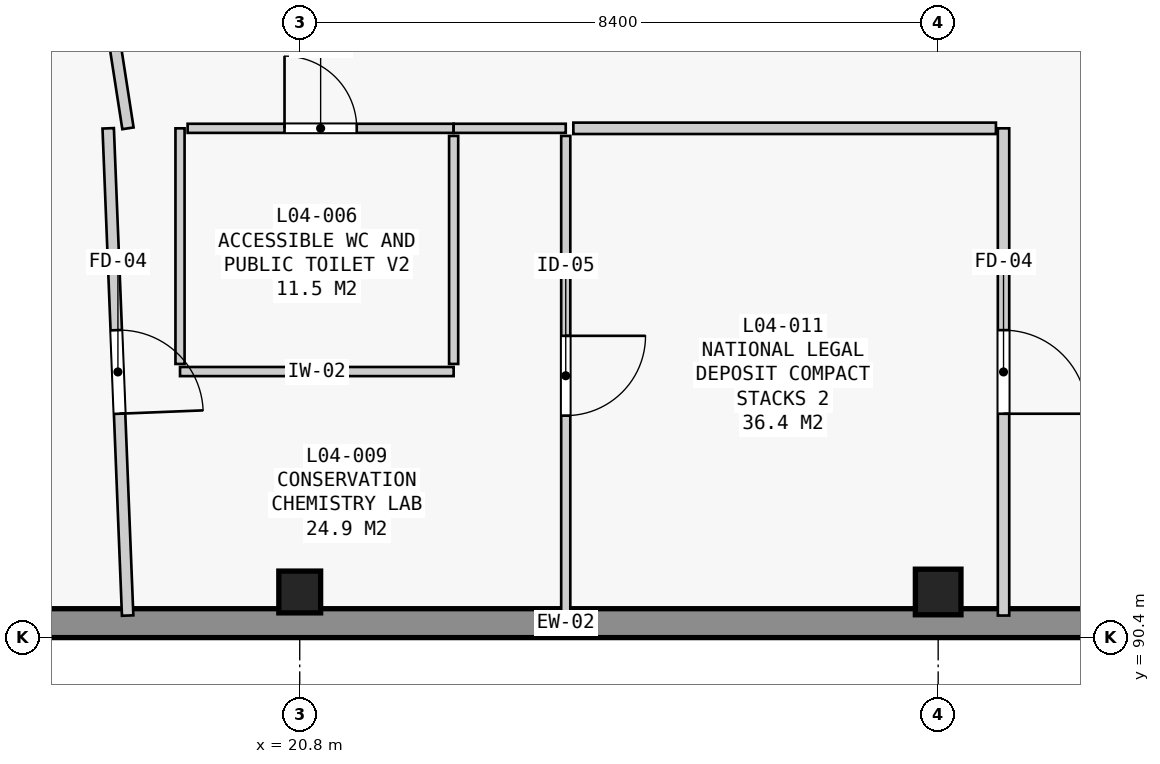
"""IFC4 building model, lengths in metres.
Left out: names, types, materials, properties, quantities, classifications, styles, units other than length and angle.
Written with IfcOpenShell. Run it as: python <this file> out.ifc"""

import sys

from ifc_helpers import new_model, si_unit, direction, frame, frame_2d, origin, origin_2d, place, context, subcontext, project, spatial, rectangle, extrude, element, fill, save


model = new_model("IFC4")
c1 = context("Model", 3, precision=1e-05, world=origin(), true_north=direction((0.0, 1.0)))
c2 = subcontext(c1, "Body", "Model", "MODEL_VIEW")
j1 = project(units=[si_unit("LENGTHUNIT", "METRE"), si_unit("PLANEANGLEUNIT", "RADIAN")], contexts=[c1])
p1 = place(None, origin())
s1 = spatial("IfcSite", under=j1, at=p1, CompositionType="ELEMENT")
p2 = place(p1, origin())
s2 = spatial("IfcBuilding", under=s1, at=p2, CompositionType="ELEMENT")
p3 = place(p2, frame((0.0, 0.0, 18.3)))
s3 = spatial("IfcBuildingStorey", under=s2, at=p3, CompositionType="ELEMENT", Elevation=18.3)
p4 = place(p3, frame((20.8, 91.0, 0.0), z_axis=(0.0, 0.0, 1.0), x_axis=(1.0, 0.0, 0.0)))
e1 = element("IfcColumn", 1, at=p4, inside=s3, PredefinedType="COLUMN", context=c2, shape_type="SweptSolid", body=[
    extrude(rectangle(XDim=0.55, YDim=0.55, at=origin_2d()), origin(), (0.0, 0.0, 1.0), 4.2),
])
p5 = place(p3, frame((29.2, 91.0, 0.0), z_axis=(0.0, 0.0, 1.0), x_axis=(1.0, 0.0, 0.0)))
e2 = element("IfcColumn", 2, at=p5, inside=s3, PredefinedType="COLUMN", context=c2, shape_type="SweptSolid", body=[
    extrude(rectangle(XDim=0.6, YDim=0.6, at=origin_2d()), origin(), (0.0, 0.0, 1.0), 4.2),
])
p6 = place(p3, frame((36.01, 90.59, 0.0), z_axis=(0.0, 0.0, 1.0), x_axis=(-1.0, 0.0, 0.0)))
e3 = element("IfcWall", 3, at=p6, inside=s3, PredefinedType="STANDARD", context=c2, shape_type="SweptSolid", body=[
    extrude(rectangle(XDim=23.42, YDim=0.38, at=frame_2d((11.71, 0.0))), origin(), (0.0, 0.0, 1.0), 3.94),
])
p7 = place(p3, frame((22.825, 93.9, 0.0), z_axis=(0.0, 0.0, 1.0), x_axis=(-1.0, 0.0, 0.0)))
e4 = element("IfcWall", 4, at=p7, inside=s3, PredefinedType="PARTITIONING", context=c2, shape_type="SweptSolid", body=[
    extrude(rectangle(XDim=3.6, YDim=0.12, at=frame_2d((1.8, 0.0))), origin(), (0.0, 0.0, 1.0), 3.07),
])
p8 = place(p3, frame((19.225, 94.0, 0.0), z_axis=(0.0, 0.0, 1.0), x_axis=(0.0, 1.0, 0.0)))
e5 = element("IfcWall", 5, at=p8, inside=s3, PredefinedType="PARTITIONING", context=c2, shape_type="SweptSolid", body=[
    extrude(rectangle(XDim=3.1, YDim=0.12, at=frame_2d((1.55, 0.0))), origin(), (0.0, 0.0, 1.0), 3.88),
])
p9 = place(p3, frame((19.325, 97.1, 0.0), z_axis=(0.0, 0.0, 1.0), x_axis=(1.0, 0.0, 0.0)))
e6 = element("IfcWall", 6, at=p9, inside=s3, PredefinedType="PARTITIONING", context=c2, shape_type="SweptSolid", body=[
    extrude(rectangle(XDim=3.5, YDim=0.12, at=frame_2d((1.75, 0.0))), origin(), (0.0, 0.0, 1.0), 3.07),
])
p10 = place(p9, frame((1.275, 0.0, 0.0)))
e7 = element("IfcOpeningElement", 7, at=p10, cuts=e6, PredefinedType="OPENING", context=c2, shape_type="SweptSolid", body=[
    extrude(rectangle(XDim=0.95, YDim=2.15, at=frame_2d((0.475, 1.075))), frame((0.0, 0.07, 0.0), z_axis=(0.0, -1.0, 0.0), x_axis=(1.0, 0.0, 0.0)), (0.0, 0.0, 1.0), 0.14),
])
p11 = place(p3, frame((22.825, 97.0, 0.0), z_axis=(0.0, 0.0, 1.0), x_axis=(0.0, -1.0, 0.0)))
e8 = element("IfcWall", 8, at=p11, inside=s3, PredefinedType="PARTITIONING", context=c2, shape_type="SweptSolid", body=[
    extrude(rectangle(XDim=3.0, YDim=0.12, at=frame_2d((1.5, 0.0))), origin(), (0.0, 0.0, 1.0), 3.88),
])
p12 = place(p3, frame((18.295, 98.681, 0.0), z_axis=(0.0, 0.0, 1.0), x_axis=(0.152905692797, -0.988240784986, 0.0)))
e9 = element("IfcWall", 9, at=p12, inside=s3, PredefinedType="PARTITIONING", context=c2, shape_type="SweptSolid", body=[
    extrude(rectangle(XDim=1.6, YDim=0.15, at=frame_2d((0.8, 0.0))), origin(), (0.0, 0.0, 1.0), 3.88),
])
p13 = place(p3, frame((18.28, 97.1, 0.0), z_axis=(0.0, 0.0, 1.0), x_axis=(0.039882928426, -0.999204359488, 0.0)))
e10 = element("IfcWall", 10, at=p13, inside=s3, PredefinedType="PARTITIONING", context=c2, shape_type="SweptSolid", body=[
    extrude(rectangle(XDim=6.415, YDim=0.15, at=frame_2d((3.208, 0.0))), origin(), (0.0, 0.0, 1.0), 3.17),
])
p14 = place(p13, frame((2.658, 0.0, 0.0)))
e11 = element("IfcOpeningElement", 11, at=p14, cuts=e10, PredefinedType="OPENING", context=c2, shape_type="SweptSolid", body=[
    extrude(rectangle(XDim=1.1, YDim=2.15, at=frame_2d((0.55, 1.075))), frame((0.0, 0.085, 0.0), z_axis=(0.0, -1.0, 0.0), x_axis=(1.0, 0.0, 0.0)), (0.0, 0.0, 1.0), 0.17),
])
p15 = place(p3, frame((22.825, 97.1, 0.0), z_axis=(0.0, 0.0, 1.0), x_axis=(1.0, 0.0, 0.0)))
e12 = element("IfcWall", 12, at=p15, inside=s3, PredefinedType="PARTITIONING", context=c2, shape_type="SweptSolid", body=[
    extrude(rectangle(XDim=1.475, YDim=0.12, at=frame_2d((0.738, 0.0))), origin(), (0.0, 0.0, 1.0), 3.88),
])
p16 = place(p3, frame((24.3, 97.0, 0.0), z_axis=(0.0, 0.0, 1.0), x_axis=(0.0, -1.0, 0.0)))
e13 = element("IfcWall", 13, at=p16, inside=s3, PredefinedType="PARTITIONING", context=c2, shape_type="SweptSolid", body=[
    extrude(rectangle(XDim=6.31, YDim=0.12, at=frame_2d((3.155, 0.0))), origin(), (0.0, 0.0, 1.0), 3.07),
])
p17 = place(p16, frame((2.63, 0.0, 0.0)))
e14 = element("IfcOpeningElement", 14, at=p17, cuts=e13, PredefinedType="OPENING", context=c2, shape_type="SweptSolid", body=[
    extrude(rectangle(XDim=1.05, YDim=2.15, at=frame_2d((0.525, 1.075))), frame((0.0, 0.07, 0.0), z_axis=(0.0, -1.0, 0.0), x_axis=(1.0, 0.0, 0.0)), (0.0, 0.0, 1.0), 0.14),
])
p18 = place(p3, frame((30.06, 97.1, 0.0), z_axis=(0.0, 0.0, 1.0), x_axis=(0.0, -1.0, 0.0)))
e15 = element("IfcWall", 15, at=p18, inside=s3, PredefinedType="PARTITIONING", context=c2, shape_type="SweptSolid", body=[
    extrude(rectangle(XDim=6.41, YDim=0.15, at=frame_2d((3.205, 0.0))), origin(), (0.0, 0.0, 1.0), 3.12),
])
p19 = place(p18, frame((2.655, 0.0, 0.0)))
e16 = element("IfcOpeningElement", 16, at=p19, cuts=e15, PredefinedType="OPENING", context=c2, shape_type="SweptSolid", body=[
    extrude(rectangle(XDim=1.1, YDim=2.15, at=frame_2d((0.55, 1.075))), frame((0.0, 0.085, 0.0), z_axis=(0.0, -1.0, 0.0), x_axis=(1.0, 0.0, 0.0)), (0.0, 0.0, 1.0), 0.17),
])
p20 = place(p3, frame((24.4, 97.1, 0.0), z_axis=(0.0, 0.0, 1.0), x_axis=(1.0, 0.0, 0.0)))
e17 = element("IfcWall", 17, at=p20, inside=s3, PredefinedType="PARTITIONING", context=c2, shape_type="SweptSolid", body=[
    extrude(rectangle(XDim=5.56, YDim=0.15, at=frame_2d((2.78, 0.0))), origin(), (0.0, 0.0, 1.0), 3.12),
])
p21 = place(p10, origin())
e18 = element("IfcDoor", 18, at=p21, inside=s3, OperationType="SINGLE_SWING_LEFT", PredefinedType="DOOR", context=c2, shape_type="SweptSolid", body=[
    extrude(rectangle(XDim=0.95, YDim=2.15, at=frame_2d((0.475, 1.075))), frame((0.0, 0.025, 0.0), z_axis=(0.0, -1.0, 0.0), x_axis=(1.0, 0.0, 0.0)), (0.0, 0.0, 1.0), 0.05),
])
fill(e7, e18)
p22 = place(p14, origin())
e19 = element("IfcDoor", 19, at=p22, inside=s3, OperationType="SINGLE_SWING_RIGHT", PredefinedType="DOOR", context=c2, shape_type="SweptSolid", body=[
    extrude(rectangle(XDim=1.1, YDim=2.15, at=frame_2d((0.55, 1.075))), frame((0.0, 0.025, 0.0), z_axis=(0.0, -1.0, 0.0), x_axis=(1.0, 0.0, 0.0)), (0.0, 0.0, 1.0), 0.05),
])
fill(e11, e19)
p23 = place(p17, origin())
e20 = element("IfcDoor", 20, at=p23, inside=s3, OperationType="SINGLE_SWING_LEFT", PredefinedType="DOOR", context=c2, shape_type="SweptSolid", body=[
    extrude(rectangle(XDim=1.05, YDim=2.15, at=frame_2d((0.525, 1.075))), frame((0.0, 0.025, 0.0), z_axis=(0.0, -1.0, 0.0), x_axis=(1.0, 0.0, 0.0)), (0.0, 0.0, 1.0), 0.05),
])
fill(e14, e20)
p24 = place(p19, origin())
e21 = element("IfcDoor", 21, at=p24, inside=s3, OperationType="SINGLE_SWING_RIGHT", PredefinedType="DOOR", context=c2, shape_type="SweptSolid", body=[
    extrude(rectangle(XDim=1.1, YDim=2.15, at=frame_2d((0.55, 1.075))), frame((0.0, 0.025, 0.0), z_axis=(0.0, -1.0, 0.0), x_axis=(1.0, 0.0, 0.0)), (0.0, 0.0, 1.0), 0.05),
])
fill(e16, e21)
save(model, sys.argv[1])
